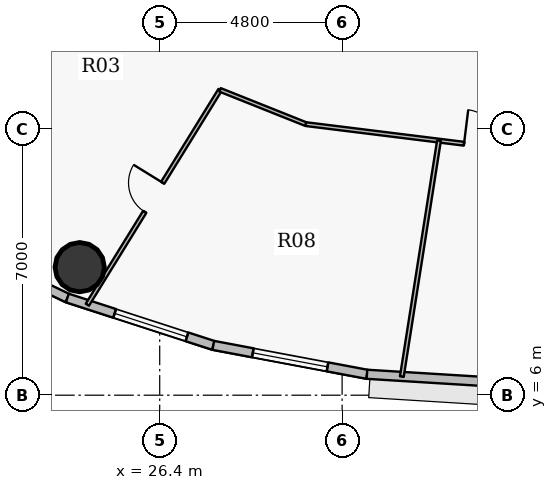
"""IFC4 building model, lengths in metres.
Left out: names, types, materials, properties, quantities, classifications, styles, units other than length and angle.
Written with IfcOpenShell. Run it as: python <this file> out.ifc"""

import sys

from ifc_helpers import new_model, si_unit, direction, frame, frame_2d, origin, origin_2d, place, context, subcontext, project, spatial, rectangle, hollow_circle, extrude, source, transform, mapped, element, fill, save


model = new_model("IFC4")
c1 = context("Model", 3, precision=1e-05, world=origin(), true_north=direction((0.0, 1.0)))
c2 = subcontext(c1, "Body", "Model", "MODEL_VIEW")
j1 = project(units=[si_unit("LENGTHUNIT", "METRE"), si_unit("PLANEANGLEUNIT", "RADIAN")], contexts=[c1])
p1 = place(None, origin())
s1 = spatial("IfcSite", under=j1, at=p1, CompositionType="ELEMENT")
p2 = place(p1, origin())
s2 = spatial("IfcBuilding", under=s1, at=p2, CompositionType="ELEMENT")
p3 = place(p2, frame((0.0, 0.0, 186.15)))
s3 = spatial("IfcBuildingStorey", under=s2, at=p3, CompositionType="ELEMENT", Elevation=186.15)
p4 = place(p3, frame((24.294, 9.369, 0.0), z_axis=(0.0, 0.0, 1.0), x_axis=(1.0, 0.0, 0.0)))
e1 = element("IfcColumn", 1, at=p4, inside=s3, PredefinedType="COLUMN", context=c2, shape_type="SweptSolid", body=[
    extrude(hollow_circle(Radius=0.65, WallThickness=0.04, at=origin_2d()), origin(), (0.0, 0.0, 1.0), 3.75),
])
p5 = place(p3, frame((23.97, 8.556, 0.0), z_axis=(0.0, 0.0, 1.0), x_axis=(-0.901564733809, 0.432644231155, 0.0)))
e2 = element("IfcWall", 2, at=p5, inside=s3, PredefinedType="SOLIDWALL", context=c2, shape_type="SweptSolid", body=[
    extrude(rectangle(XDim=3.93, YDim=0.24, at=frame_2d((1.965, 0.0))), origin(), (0.0, 0.0, 1.0), 3.5),
])
p6 = place(p5, frame((0.965, 0.0, 0.9)))
e3 = element("IfcOpeningElement", 3, at=p6, cuts=e2, PredefinedType="OPENING", context=c2, shape_type="SweptSolid", body=[
    extrude(rectangle(XDim=2.0, YDim=1.75, at=origin_2d()), frame((1.0, 0.13, 0.875), z_axis=(0.0, -1.0, 0.0), x_axis=(1.0, 0.0, 0.0)), (0.0, 0.0, 1.0), 0.26),
])
p7 = place(p3, frame((27.811, 7.311, 0.0), z_axis=(0.0, 0.0, 1.0), x_axis=(-0.951209870236, 0.30854462038, 0.0)))
e4 = element("IfcWall", 4, at=p7, inside=s3, PredefinedType="SOLIDWALL", context=c2, shape_type="SweptSolid", body=[
    extrude(rectangle(XDim=4.038, YDim=0.24, at=frame_2d((2.019, 0.0))), origin(), (0.0, 0.0, 1.0), 3.5),
])
p8 = place(p7, frame((0.729, 0.0, 0.9)))
e5 = element("IfcOpeningElement", 5, at=p8, cuts=e4, PredefinedType="OPENING", context=c2, shape_type="SweptSolid", body=[
    extrude(rectangle(XDim=2.0, YDim=1.75, at=origin_2d()), frame((1.0, 0.13, 0.875), z_axis=(0.0, -1.0, 0.0), x_axis=(1.0, 0.0, 0.0)), (0.0, 0.0, 1.0), 0.26),
])
p9 = place(p3, frame((31.854, 6.551, 0.0), z_axis=(0.0, 0.0, 1.0), x_axis=(-0.982788108205, 0.184736391573, 0.0)))
e6 = element("IfcWall", 6, at=p9, inside=s3, PredefinedType="SOLIDWALL", context=c2, shape_type="SweptSolid", body=[
    extrude(rectangle(XDim=4.114, YDim=0.24, at=frame_2d((2.057, 0.0))), origin(), (0.0, 0.0, 1.0), 3.5),
])
p10 = place(p9, frame((1.057, 0.0, 0.9)))
e7 = element("IfcOpeningElement", 7, at=p10, cuts=e6, PredefinedType="OPENING", context=c2, shape_type="SweptSolid", body=[
    extrude(rectangle(XDim=2.0, YDim=1.75, at=origin_2d()), frame((1.0, 0.13, 0.875), z_axis=(0.0, -1.0, 0.0), x_axis=(1.0, 0.0, 0.0)), (0.0, 0.0, 1.0), 0.26),
])
p11 = place(p3, frame((36.0, 6.295, 0.0), z_axis=(0.0, 0.0, 1.0), x_axis=(-0.998104600619, 0.061540281305, 0.0)))
e8 = element("IfcWall", 8, at=p11, inside=s3, PredefinedType="SOLIDWALL", context=c2, shape_type="SweptSolid", body=[
    extrude(rectangle(XDim=4.154, YDim=0.24, at=frame_2d((2.077, 0.0))), origin(), (0.0, 0.0, 1.0), 3.5),
])
p12 = place(p3, frame((24.497, 8.38, 0.0), z_axis=(0.0, 0.0, 1.0), x_axis=(0.525599261466, 0.850732282417, 0.0)))
e9 = element("IfcWall", 9, at=p12, inside=s3, PredefinedType="PARTITIONING", context=c2, shape_type="SweptSolid", body=[
    extrude(rectangle(XDim=6.645, YDim=0.1, at=frame_2d((3.322, 0.0))), origin(), (0.0, 0.0, 1.0), 2.935),
])
p13 = place(p12, frame((2.872, 0.0, 0.0)))
e10 = element("IfcOpeningElement", 10, at=p13, cuts=e9, PredefinedType="OPENING", context=c2, shape_type="SweptSolid", body=[
    extrude(rectangle(XDim=0.9, YDim=2.1, at=origin_2d()), frame((0.45, 0.06, 1.05), z_axis=(0.0, -1.0, 0.0), x_axis=(1.0, 0.0, 0.0)), (0.0, 0.0, 1.0), 0.12),
])
p14 = place(p3, frame((27.989, 14.033, 0.0), z_axis=(0.0, 0.0, 1.0), x_axis=(0.928788148018, -0.370611084699, 0.0)))
e11 = element("IfcWall", 11, at=p14, inside=s3, PredefinedType="PARTITIONING", context=c2, shape_type="SweptSolid", body=[
    extrude(rectangle(XDim=2.43, YDim=0.1, at=frame_2d((1.215, 0.0))), origin(), (0.0, 0.0, 1.0), 3.5),
])
p15 = place(p3, frame((30.246, 13.133, 0.0), z_axis=(0.0, 0.0, 1.0), x_axis=(0.992396615981, -0.123081097612, 0.0)))
e12 = element("IfcWall", 12, at=p15, inside=s3, PredefinedType="PARTITIONING", context=c2, shape_type="SweptSolid", body=[
    extrude(rectangle(XDim=5.798, YDim=0.1, at=frame_2d((2.899, 0.0))), origin(), (0.0, 0.0, 1.0), 2.935),
])
p16 = place(p15, frame((4.194, 0.0, 0.0)))
e13 = element("IfcOpeningElement", 13, at=p16, cuts=e12, PredefinedType="OPENING", context=c2, shape_type="SweptSolid", body=[
    extrude(rectangle(XDim=0.9, YDim=2.1, at=origin_2d()), frame((0.45, 0.06, 1.05), z_axis=(0.0, -1.0, 0.0), x_axis=(1.0, 0.0, 0.0)), (0.0, 0.0, 1.0), 0.12),
])
p17 = place(p3, frame((32.772, 6.489, 0.0), z_axis=(0.0, 0.0, 1.0), x_axis=(0.155479878696, 0.987839059423, 0.0)))
e14 = element("IfcWall", 14, at=p17, inside=s3, PredefinedType="PARTITIONING", context=c2, shape_type="SweptSolid", body=[
    extrude(rectangle(XDim=6.286, YDim=0.1, at=frame_2d((3.143, 0.0))), origin(), (0.0, 0.0, 1.0), 2.935),
])
m1 = source(origin(), c2, "Body", "SweptSolid", [
    extrude(rectangle(XDim=2.0, YDim=1.75, at=origin_2d()), frame((1.0, 0.03, 0.875), z_axis=(0.0, -1.0, 0.0), x_axis=(1.0, 0.0, 0.0)), (0.0, 0.0, 1.0), 0.06),
])
p18 = place(p8, origin())
e15 = element("IfcWindow", 15, at=p18, inside=s3, PartitioningType="DOUBLE_PANEL_VERTICAL", PredefinedType="WINDOW", context=c2, shape_type="MappedRepresentation", body=[
    mapped(m1, transform((0.0, 0.0, 0.0), x_axis=(1.0, 0.0, 0.0), y_axis=(0.0, 1.0, 0.0), z_axis=(0.0, 0.0, 1.0), scale=1.0)),
])
fill(e5, e15)
p19 = place(p10, origin())
e16 = element("IfcWindow", 16, at=p19, inside=s3, PartitioningType="DOUBLE_PANEL_VERTICAL", PredefinedType="WINDOW", context=c2, shape_type="MappedRepresentation", body=[
    mapped(m1, transform((0.0, 0.0, 0.0), x_axis=(1.0, 0.0, 0.0), y_axis=(0.0, 1.0, 0.0), z_axis=(0.0, 0.0, 1.0), scale=1.0)),
])
fill(e7, e16)
m2 = source(origin(), c2, "Body", "SweptSolid", [
    extrude(rectangle(XDim=0.9, YDim=2.1, at=origin_2d()), frame((0.45, 0.025, 1.05), z_axis=(0.0, -1.0, 0.0), x_axis=(1.0, 0.0, 0.0)), (0.0, 0.0, 1.0), 0.05),
])
p20 = place(p13, origin())
e17 = element("IfcDoor", 17, at=p20, inside=s3, OperationType="SINGLE_SWING_RIGHT", PredefinedType="DOOR", context=c2, shape_type="MappedRepresentation", body=[
    mapped(m2, transform((0.0, 0.0, 0.0), x_axis=(1.0, 0.0, 0.0), y_axis=(0.0, 1.0, 0.0), z_axis=(0.0, 0.0, 1.0), scale=1.0)),
])
fill(e10, e17)
p21 = place(p16, origin())
e18 = element("IfcDoor", 18, at=p21, inside=s3, OperationType="SINGLE_SWING_LEFT", PredefinedType="DOOR", context=c2, shape_type="MappedRepresentation", body=[
    mapped(m2, transform((0.0, 0.0, 0.0), x_axis=(1.0, 0.0, 0.0), y_axis=(0.0, 1.0, 0.0), z_axis=(0.0, 0.0, 1.0), scale=1.0)),
])
fill(e13, e18)
save(model, sys.argv[1])
